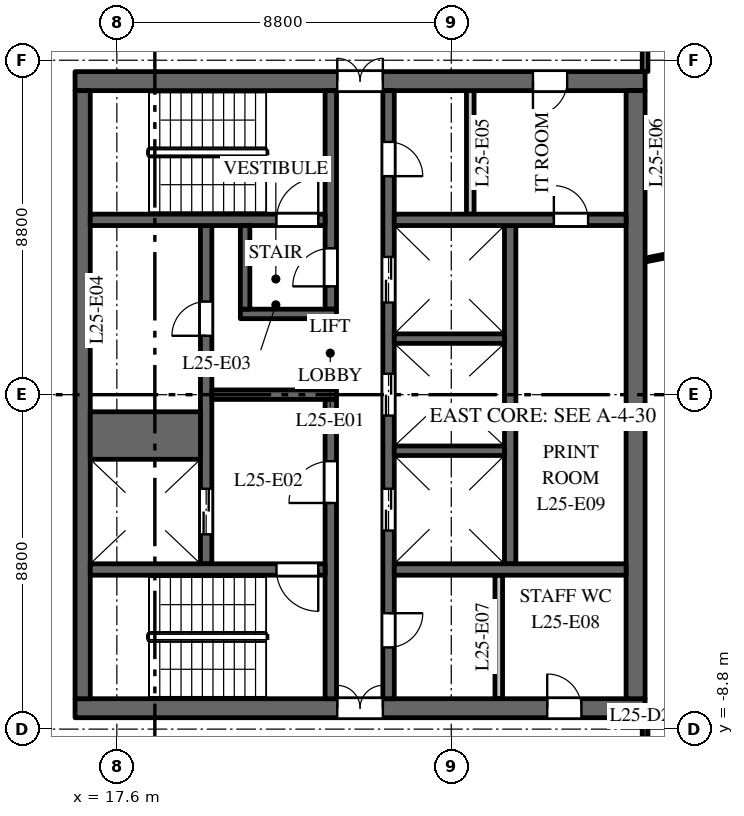
"""IFC4 building model, lengths in metres.
Left out: names, types, materials, properties, quantities, classifications, styles, units other than length and angle.
Written with IfcOpenShell. Run it as: python <this file> out.ifc"""

import sys

from ifc_helpers import new_model, si_unit, direction, frame, frame_2d, origin, place, context, subcontext, project, spatial, rectangle, extrude, element, fill, save


model = new_model("IFC4")
c1 = context("Model", 3, precision=1e-05, world=origin(), true_north=direction((0.0, 1.0)))
c2 = subcontext(c1, "Body", "Model", "MODEL_VIEW")
j1 = project(units=[si_unit("LENGTHUNIT", "METRE"), si_unit("PLANEANGLEUNIT", "RADIAN")], contexts=[c1])
p1 = place(None, origin())
s1 = spatial("IfcSite", under=j1, at=p1, CompositionType="ELEMENT")
p2 = place(p1, origin())
s2 = spatial("IfcBuilding", under=s1, at=p2, CompositionType="ELEMENT")
p3 = place(p2, frame((0.0, 0.0, 112.0)))
s3 = spatial("IfcBuildingStorey", under=s2, at=p3, CompositionType="ELEMENT", Elevation=112.0)
p4 = place(p3, frame((16.5, 8.25, 0.0), z_axis=(0.0, 0.0, 1.0), x_axis=(1.0, 0.0, 0.0)))
e1 = element("IfcWall", 1, at=p4, inside=s3, PredefinedType="SHEAR", context=c2, shape_type="SweptSolid", body=[
    extrude(rectangle(XDim=15.0, YDim=0.5, at=frame_2d((7.5, 0.0))), origin(), (0.0, 0.0, 1.0), 3.7),
])
p5 = place(p4, frame((6.9, 0.0, 0.0)))
e2 = element("IfcOpeningElement", 2, at=p5, cuts=e1, PredefinedType="OPENING", context=c2, shape_type="SweptSolid", body=[
    extrude(rectangle(XDim=1.2, YDim=2.1, at=frame_2d((0.6, 1.05))), frame((0.0, 0.26, 0.0), z_axis=(0.0, -1.0, 0.0), x_axis=(1.0, 0.0, 0.0)), (0.0, 0.0, 1.0), 0.52),
])
p6 = place(p4, frame((12.05, 0.0, 0.0)))
e3 = element("IfcOpeningElement", 3, at=p6, cuts=e1, PredefinedType="OPENING", context=c2, shape_type="SweptSolid", body=[
    extrude(rectangle(XDim=0.9, YDim=2.1, at=frame_2d((0.45, 1.05))), frame((0.0, 0.26, 0.0), z_axis=(0.0, -1.0, 0.0), x_axis=(1.0, 0.0, 0.0)), (0.0, 0.0, 1.0), 0.52),
])
p7 = place(p3, frame((16.5, -8.25, 0.0), z_axis=(0.0, 0.0, 1.0), x_axis=(1.0, 0.0, 0.0)))
e4 = element("IfcWall", 4, at=p7, inside=s3, PredefinedType="SHEAR", context=c2, shape_type="SweptSolid", body=[
    extrude(rectangle(XDim=15.0, YDim=0.5, at=frame_2d((7.5, 0.0))), origin(), (0.0, 0.0, 1.0), 3.7),
])
p8 = place(p7, frame((6.9, 0.0, 0.0)))
e5 = element("IfcOpeningElement", 5, at=p8, cuts=e4, PredefinedType="OPENING", context=c2, shape_type="SweptSolid", body=[
    extrude(rectangle(XDim=1.2, YDim=2.1, at=frame_2d((0.6, 1.05))), frame((0.0, 0.26, 0.0), z_axis=(0.0, -1.0, 0.0), x_axis=(1.0, 0.0, 0.0)), (0.0, 0.0, 1.0), 0.52),
])
p9 = place(p7, frame((12.425, 0.0, 0.0)))
e6 = element("IfcOpeningElement", 6, at=p9, cuts=e4, PredefinedType="OPENING", context=c2, shape_type="SweptSolid", body=[
    extrude(rectangle(XDim=0.9, YDim=2.1, at=frame_2d((0.45, 1.05))), frame((0.0, 0.26, 0.0), z_axis=(0.0, -1.0, 0.0), x_axis=(1.0, 0.0, 0.0)), (0.0, 0.0, 1.0), 0.52),
])
p10 = place(p3, frame((27.95, -4.45, 0.0), z_axis=(0.0, 0.0, 1.0), x_axis=(0.0, 1.0, 0.0)))
e7 = element("IfcWall", 7, at=p10, inside=s3, PredefinedType="SHEAR", context=c2, shape_type="SweptSolid", body=[
    extrude(rectangle(XDim=8.9, YDim=0.3, at=frame_2d((4.45, 0.0))), origin(), (0.0, 0.0, 1.0), 3.7),
])
p11 = place(p3, frame((19.95, -4.45, 0.0), z_axis=(0.0, 0.0, 1.0), x_axis=(0.0, 1.0, 0.0)))
e8 = element("IfcWall", 8, at=p11, inside=s3, PredefinedType="SHEAR", context=c2, shape_type="SweptSolid", body=[
    extrude(rectangle(XDim=8.9, YDim=0.3, at=frame_2d((4.45, 0.0))), origin(), (0.0, 0.0, 1.0), 3.7),
])
p12 = place(p11, frame((0.775, 0.0, 0.0)))
e9 = element("IfcOpeningElement", 9, at=p12, cuts=e8, PredefinedType="OPENING", context=c2, shape_type="SweptSolid", body=[
    extrude(rectangle(XDim=1.2, YDim=2.1, at=frame_2d((0.6, 1.05))), frame((0.0, 0.16, 0.0), z_axis=(0.0, -1.0, 0.0), x_axis=(1.0, 0.0, 0.0)), (0.0, 0.0, 1.0), 0.32),
])
p13 = place(p11, frame((6.0, 0.0, 0.0)))
e10 = element("IfcOpeningElement", 10, at=p13, cuts=e8, PredefinedType="OPENING", context=c2, shape_type="SweptSolid", body=[
    extrude(rectangle(XDim=0.9, YDim=2.1, at=frame_2d((0.45, 1.05))), frame((0.0, 0.16, 0.0), z_axis=(0.0, -1.0, 0.0), x_axis=(1.0, 0.0, 0.0)), (0.0, 0.0, 1.0), 0.32),
])
p14 = place(p3, frame((24.75, -8.0, 0.0), z_axis=(0.0, 0.0, 1.0), x_axis=(0.0, 1.0, 0.0)))
e11 = element("IfcWall", 11, at=p14, inside=s3, PredefinedType="SHEAR", context=c2, shape_type="SweptSolid", body=[
    extrude(rectangle(XDim=16.0, YDim=0.3, at=frame_2d((8.0, 0.0))), origin(), (0.0, 0.0, 1.0), 3.7),
])
p15 = place(p14, frame((4.425, 0.0, 0.0)))
e12 = element("IfcOpeningElement", 12, at=p15, cuts=e11, PredefinedType="OPENING", context=c2, shape_type="SweptSolid", body=[
    extrude(rectangle(XDim=1.1, YDim=2.1, at=frame_2d((0.55, 1.05))), frame((0.0, 0.16, 0.0), z_axis=(0.0, -1.0, 0.0), x_axis=(1.0, 0.0, 0.0)), (0.0, 0.0, 1.0), 0.32),
])
p16 = place(p14, frame((7.45, 0.0, 0.0)))
e13 = element("IfcOpeningElement", 13, at=p16, cuts=e11, PredefinedType="OPENING", context=c2, shape_type="SweptSolid", body=[
    extrude(rectangle(XDim=1.1, YDim=2.1, at=frame_2d((0.55, 1.05))), frame((0.0, 0.16, 0.0), z_axis=(0.0, -1.0, 0.0), x_axis=(1.0, 0.0, 0.0)), (0.0, 0.0, 1.0), 0.32),
])
p17 = place(p14, frame((10.425, 0.0, 0.0)))
e14 = element("IfcOpeningElement", 14, at=p17, cuts=e11, PredefinedType="OPENING", context=c2, shape_type="SweptSolid", body=[
    extrude(rectangle(XDim=1.2, YDim=2.1, at=frame_2d((0.6, 1.05))), frame((0.0, 0.16, 0.0), z_axis=(0.0, -1.0, 0.0), x_axis=(1.0, 0.0, 0.0)), (0.0, 0.0, 1.0), 0.32),
])
p18 = place(p14, frame((13.75, 0.0, 0.0)))
e15 = element("IfcOpeningElement", 15, at=p18, cuts=e11, PredefinedType="OPENING", context=c2, shape_type="SweptSolid", body=[
    extrude(rectangle(XDim=0.9, YDim=2.1, at=frame_2d((0.45, 1.05))), frame((0.0, 0.16, 0.0), z_axis=(0.0, -1.0, 0.0), x_axis=(1.0, 0.0, 0.0)), (0.0, 0.0, 1.0), 0.32),
])
p19 = place(p14, frame((1.35, 0.0, 0.0)))
e16 = element("IfcOpeningElement", 16, at=p19, cuts=e11, PredefinedType="OPENING", context=c2, shape_type="SweptSolid", body=[
    extrude(rectangle(XDim=0.9, YDim=2.1, at=frame_2d((0.45, 1.05))), frame((0.0, 0.16, 0.0), z_axis=(0.0, -1.0, 0.0), x_axis=(1.0, 0.0, 0.0)), (0.0, 0.0, 1.0), 0.32),
])
p20 = place(p3, frame((20.1, 0.0, 0.0), z_axis=(0.0, 0.0, 1.0), x_axis=(1.0, 0.0, 0.0)))
e17 = element("IfcWall", 17, at=p20, inside=s3, PredefinedType="SHEAR", context=c2, shape_type="SweptSolid", body=[
    extrude(rectangle(XDim=3.28, YDim=0.25, at=frame_2d((1.64, 0.0))), origin(), (0.0, 0.0, 1.0), 3.7),
])
p21 = place(p3, frame((16.7, -8.0, 0.0), z_axis=(0.0, 0.0, 1.0), x_axis=(0.0, 1.0, 0.0)))
e18 = element("IfcWall", 18, at=p21, inside=s3, PredefinedType="SHEAR", context=c2, shape_type="SweptSolid", body=[
    extrude(rectangle(XDim=16.0, YDim=0.4, at=frame_2d((8.0, 0.0))), origin(), (0.0, 0.0, 1.0), 3.7),
])
p22 = place(p3, frame((31.25, -8.0, 0.0), z_axis=(0.0, 0.0, 1.0), x_axis=(0.0, 1.0, 0.0)))
e19 = element("IfcWall", 19, at=p22, inside=s3, PredefinedType="SHEAR", context=c2, shape_type="SweptSolid", body=[
    extrude(rectangle(XDim=16.0, YDim=0.5, at=frame_2d((8.0, 0.0))), origin(), (0.0, 0.0, 1.0), 3.7),
])
p23 = place(p3, frame((24.9, 4.6, 0.0), z_axis=(0.0, 0.0, 1.0), x_axis=(1.0, 0.0, 0.0)))
e20 = element("IfcWall", 20, at=p23, inside=s3, PredefinedType="SHEAR", context=c2, shape_type="SweptSolid", body=[
    extrude(rectangle(XDim=6.1, YDim=0.3, at=frame_2d((3.05, 0.0))), origin(), (0.0, 0.0, 1.0), 3.7),
])
p24 = place(p23, frame((4.2, 0.0, 0.0)))
e21 = element("IfcOpeningElement", 21, at=p24, cuts=e20, PredefinedType="OPENING", context=c2, shape_type="SweptSolid", body=[
    extrude(rectangle(XDim=0.9, YDim=2.1, at=frame_2d((0.45, 1.05))), frame((0.0, 0.16, 0.0), z_axis=(0.0, -1.0, 0.0), x_axis=(1.0, 0.0, 0.0)), (0.0, 0.0, 1.0), 0.32),
])
for number, where, z_axis, x_axis in (
    (22, (26.9, 4.75, 0.0), (0.0, 0.0, 1.0), (0.0, 1.0, 0.0)),
    (23, (27.65, -8.0, 0.0), (0.0, 0.0, 1.0), (0.0, 1.0, 0.0)),
):
    element("IfcWall", number, at=place(p3, frame(where, z_axis=z_axis, x_axis=x_axis)), inside=s3, PredefinedType="PARTITIONING", context=c2, shape_type="SweptSolid", body=[
        extrude(rectangle(XDim=3.25, YDim=0.2, at=frame_2d((1.625, 0.0))), origin(), (0.0, 0.0, 1.0), 3.7),
    ])
p25 = place(p3, frame((24.9, -4.6, 0.0), z_axis=(0.0, 0.0, 1.0), x_axis=(1.0, 0.0, 0.0)))
e24 = element("IfcWall", 24, at=p25, inside=s3, PredefinedType="SHEAR", context=c2, shape_type="SweptSolid", body=[
    extrude(rectangle(XDim=6.1, YDim=0.3, at=frame_2d((3.05, 0.0))), origin(), (0.0, 0.0, 1.0), 3.7),
])
p26 = place(p3, frame((16.9, -1.075, 0.0), z_axis=(0.0, 0.0, 1.0), x_axis=(1.0, 0.0, 0.0)))
e25 = element("IfcWall", 25, at=p26, inside=s3, PredefinedType="SHEAR", context=c2, shape_type="SweptSolid", body=[
    extrude(rectangle(XDim=2.9, YDim=1.25, at=frame_2d((1.45, 0.0))), origin(), (0.0, 0.0, 1.0), 3.7),
])
for number, where, z_axis, x_axis in (
    (26, (24.9, -1.475, 0.0), (0.0, 0.0, 1.0), (1.0, 0.0, 0.0)),
    (27, (24.9, 1.475, 0.0), (0.0, 0.0, 1.0), (1.0, 0.0, 0.0)),
):
    element("IfcWall", number, at=place(p3, frame(where, z_axis=z_axis, x_axis=x_axis)), inside=s3, PredefinedType="SHEAR", context=c2, shape_type="SweptSolid", body=[
        extrude(rectangle(XDim=2.9, YDim=0.25, at=frame_2d((1.45, 0.0))), origin(), (0.0, 0.0, 1.0), 3.7),
    ])
p27 = place(p3, frame((23.23, 2.25, 0.0), z_axis=(0.0, 0.0, 1.0), x_axis=(0.0, 1.0, 0.0)))
e28 = element("IfcWall", 28, at=p27, inside=s3, PredefinedType="SHEAR", context=c2, shape_type="SweptSolid", body=[
    extrude(rectangle(XDim=5.75, YDim=0.3, at=frame_2d((2.875, 0.0))), origin(), (0.0, 0.0, 1.0), 3.7),
])
p28 = place(p27, frame((0.6, 0.0, 0.0)))
e29 = element("IfcOpeningElement", 29, at=p28, cuts=e28, PredefinedType="OPENING", context=c2, shape_type="SweptSolid", body=[
    extrude(rectangle(XDim=1.0, YDim=2.1, at=frame_2d((0.5, 1.05))), frame((0.0, 0.16, 0.0), z_axis=(0.0, -1.0, 0.0), x_axis=(1.0, 0.0, 0.0)), (0.0, 0.0, 1.0), 0.32),
])
p29 = place(p3, frame((23.23, -8.0, 0.0), z_axis=(0.0, 0.0, 1.0), x_axis=(0.0, 1.0, 0.0)))
e30 = element("IfcWall", 30, at=p29, inside=s3, PredefinedType="SHEAR", context=c2, shape_type="SweptSolid", body=[
    extrude(rectangle(XDim=7.875, YDim=0.3, at=frame_2d((3.938, 0.0))), origin(), (0.0, 0.0, 1.0), 3.7),
])
p30 = place(p29, frame((5.15, 0.0, 0.0)))
e31 = element("IfcOpeningElement", 31, at=p30, cuts=e30, PredefinedType="OPENING", context=c2, shape_type="SweptSolid", body=[
    extrude(rectangle(XDim=1.1, YDim=2.1, at=frame_2d((0.55, 1.05))), frame((0.0, 0.16, 0.0), z_axis=(0.0, -1.0, 0.0), x_axis=(1.0, 0.0, 0.0)), (0.0, 0.0, 1.0), 0.32),
])
p31 = place(p3, frame((16.9, 4.6, 0.0), z_axis=(0.0, 0.0, 1.0), x_axis=(1.0, 0.0, 0.0)))
e32 = element("IfcWall", 32, at=p31, inside=s3, PredefinedType="SHEAR", context=c2, shape_type="SweptSolid", body=[
    extrude(rectangle(XDim=6.18, YDim=0.3, at=frame_2d((3.09, 0.0))), origin(), (0.0, 0.0, 1.0), 3.7),
])
p32 = place(p31, frame((4.9, 0.0, 0.0)))
e33 = element("IfcOpeningElement", 33, at=p32, cuts=e32, PredefinedType="OPENING", context=c2, shape_type="SweptSolid", body=[
    extrude(rectangle(XDim=1.1, YDim=2.1, at=frame_2d((0.55, 1.05))), frame((0.0, 0.16, 0.0), z_axis=(0.0, -1.0, 0.0), x_axis=(1.0, 0.0, 0.0)), (0.0, 0.0, 1.0), 0.32),
])
p33 = place(p3, frame((16.9, -4.6, 0.0), z_axis=(0.0, 0.0, 1.0), x_axis=(1.0, 0.0, 0.0)))
e34 = element("IfcWall", 34, at=p33, inside=s3, PredefinedType="SHEAR", context=c2, shape_type="SweptSolid", body=[
    extrude(rectangle(XDim=6.18, YDim=0.3, at=frame_2d((3.09, 0.0))), origin(), (0.0, 0.0, 1.0), 3.7),
])
p34 = place(p33, frame((4.9, 0.0, 0.0)))
e35 = element("IfcOpeningElement", 35, at=p34, cuts=e34, PredefinedType="OPENING", context=c2, shape_type="SweptSolid", body=[
    extrude(rectangle(XDim=1.1, YDim=2.1, at=frame_2d((0.55, 1.05))), frame((0.0, 0.16, 0.0), z_axis=(0.0, -1.0, 0.0), x_axis=(1.0, 0.0, 0.0)), (0.0, 0.0, 1.0), 0.32),
])
p35 = place(p3, frame((20.85, 2.125, 0.0), z_axis=(0.0, 0.0, 1.0), x_axis=(1.0, 0.0, 0.0)))
e36 = element("IfcWall", 36, at=p35, inside=s3, PredefinedType="SHEAR", context=c2, shape_type="SweptSolid", body=[
    extrude(rectangle(XDim=2.53, YDim=0.25, at=frame_2d((1.265, 0.0))), origin(), (0.0, 0.0, 1.0), 3.7),
])
p36 = place(p3, frame((20.975, 2.25, 0.0), z_axis=(0.0, 0.0, 1.0), x_axis=(0.0, 1.0, 0.0)))
e37 = element("IfcWall", 37, at=p36, inside=s3, PredefinedType="SHEAR", context=c2, shape_type="SweptSolid", body=[
    extrude(rectangle(XDim=2.2, YDim=0.25, at=frame_2d((1.1, 0.0))), origin(), (0.0, 0.0, 1.0), 3.7),
])
p37 = place(p3, frame((31.5, -10.7, 0.0), z_axis=(0.0, 0.0, 1.0), x_axis=(0.0, 1.0, 0.0)))
e38 = element("IfcWall", 38, at=p37, inside=s3, PredefinedType="PARTITIONING", context=c2, shape_type="SweptSolid", body=[
    extrude(rectangle(XDim=2.2, YDim=0.15, at=frame_2d((1.1, 0.0))), origin(), (0.0, 0.0, 1.0), 2.9),
])
p38 = place(p37, frame((0.65, 0.0, 0.0)))
e39 = element("IfcOpeningElement", 39, at=p38, cuts=e38, PredefinedType="OPENING", context=c2, shape_type="SweptSolid", body=[
    extrude(rectangle(XDim=1.0, YDim=2.1, at=frame_2d((0.5, 1.05))), frame((0.0, 0.085, 0.0), z_axis=(0.0, -1.0, 0.0), x_axis=(1.0, 0.0, 0.0)), (0.0, 0.0, 1.0), 0.17),
])
p39 = place(p3, frame((31.5, 3.542, 0.0), z_axis=(0.0, 0.0, 1.0), x_axis=(0.980357474535, 0.197228857227, 0.0)))
e40 = element("IfcWall", 40, at=p39, inside=s3, PredefinedType="PARTITIONING", context=c2, shape_type="SweptSolid", body=[
    extrude(rectangle(XDim=4.092, YDim=0.1, at=frame_2d((2.046, 0.0))), origin(), (0.0, 0.0, 1.0), 2.9),
])
p40 = place(p3, frame((31.5, 8.5, 0.0), z_axis=(0.0, 0.0, 1.0), x_axis=(0.0, 1.0, 0.0)))
e41 = element("IfcWall", 41, at=p40, inside=s3, PredefinedType="PARTITIONING", context=c2, shape_type="SweptSolid", body=[
    extrude(rectangle(XDim=2.2, YDim=0.15, at=frame_2d((1.1, 0.0))), origin(), (0.0, 0.0, 1.0), 2.9),
])
p41 = place(p12, origin())
e42 = element("IfcDoor", 42, at=p41, inside=s3, OperationType="DOUBLE_DOOR_SLIDING", PredefinedType="DOOR", context=c2, shape_type="SweptSolid", body=[
    extrude(rectangle(XDim=1.2, YDim=2.1, at=frame_2d((0.6, 1.05))), frame((0.0, 0.025, 0.0), z_axis=(0.0, -1.0, 0.0), x_axis=(1.0, 0.0, 0.0)), (0.0, 0.0, 1.0), 0.05),
])
fill(e9, e42)
p42 = place(p15, origin())
e43 = element("IfcDoor", 43, at=p42, inside=s3, OperationType="DOUBLE_DOOR_SLIDING", PredefinedType="DOOR", context=c2, shape_type="SweptSolid", body=[
    extrude(rectangle(XDim=1.1, YDim=2.1, at=frame_2d((0.55, 1.05))), frame((0.0, 0.025, 0.0), z_axis=(0.0, -1.0, 0.0), x_axis=(1.0, 0.0, 0.0)), (0.0, 0.0, 1.0), 0.05),
])
fill(e12, e43)
p43 = place(p16, origin())
e44 = element("IfcDoor", 44, at=p43, inside=s3, OperationType="DOUBLE_DOOR_SLIDING", PredefinedType="DOOR", context=c2, shape_type="SweptSolid", body=[
    extrude(rectangle(XDim=1.1, YDim=2.1, at=frame_2d((0.55, 1.05))), frame((0.0, 0.025, 0.0), z_axis=(0.0, -1.0, 0.0), x_axis=(1.0, 0.0, 0.0)), (0.0, 0.0, 1.0), 0.05),
])
fill(e13, e44)
p44 = place(p17, origin())
e45 = element("IfcDoor", 45, at=p44, inside=s3, OperationType="DOUBLE_DOOR_SLIDING", PredefinedType="DOOR", context=c2, shape_type="SweptSolid", body=[
    extrude(rectangle(XDim=1.2, YDim=2.1, at=frame_2d((0.6, 1.05))), frame((0.0, 0.025, 0.0), z_axis=(0.0, -1.0, 0.0), x_axis=(1.0, 0.0, 0.0)), (0.0, 0.0, 1.0), 0.05),
])
fill(e14, e45)
p45 = place(p32, origin())
e46 = element("IfcDoor", 46, at=p45, inside=s3, OperationType="SINGLE_SWING_LEFT", PredefinedType="DOOR", context=c2, shape_type="SweptSolid", body=[
    extrude(rectangle(XDim=1.1, YDim=2.1, at=frame_2d((0.55, 1.05))), frame((0.0, 0.025, 0.0), z_axis=(0.0, -1.0, 0.0), x_axis=(1.0, 0.0, 0.0)), (0.0, 0.0, 1.0), 0.05),
])
fill(e33, e46)
p46 = place(p34, origin())
e47 = element("IfcDoor", 47, at=p46, inside=s3, OperationType="SINGLE_SWING_RIGHT", PredefinedType="DOOR", context=c2, shape_type="SweptSolid", body=[
    extrude(rectangle(XDim=1.1, YDim=2.1, at=frame_2d((0.55, 1.05))), frame((0.0, 0.025, 0.0), z_axis=(0.0, -1.0, 0.0), x_axis=(1.0, 0.0, 0.0)), (0.0, 0.0, 1.0), 0.05),
])
fill(e35, e47)
p47 = place(p30, origin())
e48 = element("IfcDoor", 48, at=p47, inside=s3, OperationType="SINGLE_SWING_RIGHT", PredefinedType="DOOR", context=c2, shape_type="SweptSolid", body=[
    extrude(rectangle(XDim=1.1, YDim=2.1, at=frame_2d((0.55, 1.05))), frame((0.0, 0.025, 0.0), z_axis=(0.0, -1.0, 0.0), x_axis=(1.0, 0.0, 0.0)), (0.0, 0.0, 1.0), 0.05),
])
fill(e31, e48)
p48 = place(p28, origin())
e49 = element("IfcDoor", 49, at=p48, inside=s3, OperationType="SINGLE_SWING_RIGHT", PredefinedType="DOOR", context=c2, shape_type="SweptSolid", body=[
    extrude(rectangle(XDim=1.0, YDim=2.1, at=frame_2d((0.5, 1.05))), frame((0.0, 0.025, 0.0), z_axis=(0.0, -1.0, 0.0), x_axis=(1.0, 0.0, 0.0)), (0.0, 0.0, 1.0), 0.05),
])
fill(e29, e49)
p49 = place(p5, origin())
e50 = element("IfcDoor", 50, at=p49, inside=s3, OperationType="DOUBLE_DOOR_DOUBLE_SWING", PredefinedType="DOOR", context=c2, shape_type="SweptSolid", body=[
    extrude(rectangle(XDim=1.2, YDim=2.1, at=frame_2d((0.6, 1.05))), frame((0.0, 0.025, 0.0), z_axis=(0.0, -1.0, 0.0), x_axis=(1.0, 0.0, 0.0)), (0.0, 0.0, 1.0), 0.05),
])
fill(e2, e50)
p50 = place(p8, origin())
e51 = element("IfcDoor", 51, at=p50, inside=s3, OperationType="DOUBLE_DOOR_DOUBLE_SWING", PredefinedType="DOOR", context=c2, shape_type="SweptSolid", body=[
    extrude(rectangle(XDim=1.2, YDim=2.1, at=frame_2d((0.6, 1.05))), frame((0.0, 0.025, 0.0), z_axis=(0.0, -1.0, 0.0), x_axis=(1.0, 0.0, 0.0)), (0.0, 0.0, 1.0), 0.05),
])
fill(e5, e51)
p51 = place(p13, origin())
e52 = element("IfcDoor", 52, at=p51, inside=s3, OperationType="SINGLE_SWING_RIGHT", PredefinedType="DOOR", context=c2, shape_type="SweptSolid", body=[
    extrude(rectangle(XDim=0.9, YDim=2.1, at=frame_2d((0.45, 1.05))), frame((0.0, 0.025, 0.0), z_axis=(0.0, -1.0, 0.0), x_axis=(1.0, 0.0, 0.0)), (0.0, 0.0, 1.0), 0.05),
])
fill(e10, e52)
p52 = place(p18, origin())
e53 = element("IfcDoor", 53, at=p52, inside=s3, OperationType="SINGLE_SWING_LEFT", PredefinedType="DOOR", context=c2, shape_type="SweptSolid", body=[
    extrude(rectangle(XDim=0.9, YDim=2.1, at=frame_2d((0.45, 1.05))), frame((0.0, 0.025, 0.0), z_axis=(0.0, -1.0, 0.0), x_axis=(1.0, 0.0, 0.0)), (0.0, 0.0, 1.0), 0.05),
])
fill(e15, e53)
p53 = place(p6, origin())
e54 = element("IfcDoor", 54, at=p53, inside=s3, OperationType="SINGLE_SWING_LEFT", PredefinedType="DOOR", context=c2, shape_type="SweptSolid", body=[
    extrude(rectangle(XDim=0.9, YDim=2.1, at=frame_2d((0.45, 1.05))), frame((0.0, 0.025, 0.0), z_axis=(0.0, -1.0, 0.0), x_axis=(1.0, 0.0, 0.0)), (0.0, 0.0, 1.0), 0.05),
])
fill(e3, e54)
p54 = place(p19, origin())
e55 = element("IfcDoor", 55, at=p54, inside=s3, OperationType="SINGLE_SWING_RIGHT", PredefinedType="DOOR", context=c2, shape_type="SweptSolid", body=[
    extrude(rectangle(XDim=0.9, YDim=2.1, at=frame_2d((0.45, 1.05))), frame((0.0, 0.025, 0.0), z_axis=(0.0, -1.0, 0.0), x_axis=(1.0, 0.0, 0.0)), (0.0, 0.0, 1.0), 0.05),
])
fill(e16, e55)
p55 = place(p9, origin())
e56 = element("IfcDoor", 56, at=p55, inside=s3, OperationType="SINGLE_SWING_RIGHT", PredefinedType="DOOR", context=c2, shape_type="SweptSolid", body=[
    extrude(rectangle(XDim=0.9, YDim=2.1, at=frame_2d((0.45, 1.05))), frame((0.0, 0.025, 0.0), z_axis=(0.0, -1.0, 0.0), x_axis=(1.0, 0.0, 0.0)), (0.0, 0.0, 1.0), 0.05),
])
fill(e6, e56)
p56 = place(p24, origin())
e57 = element("IfcDoor", 57, at=p56, inside=s3, OperationType="SINGLE_SWING_RIGHT", PredefinedType="DOOR", context=c2, shape_type="SweptSolid", body=[
    extrude(rectangle(XDim=0.9, YDim=2.1, at=frame_2d((0.45, 1.05))), frame((0.0, 0.025, 0.0), z_axis=(0.0, -1.0, 0.0), x_axis=(1.0, 0.0, 0.0)), (0.0, 0.0, 1.0), 0.05),
])
fill(e21, e57)
save(model, sys.argv[1])
